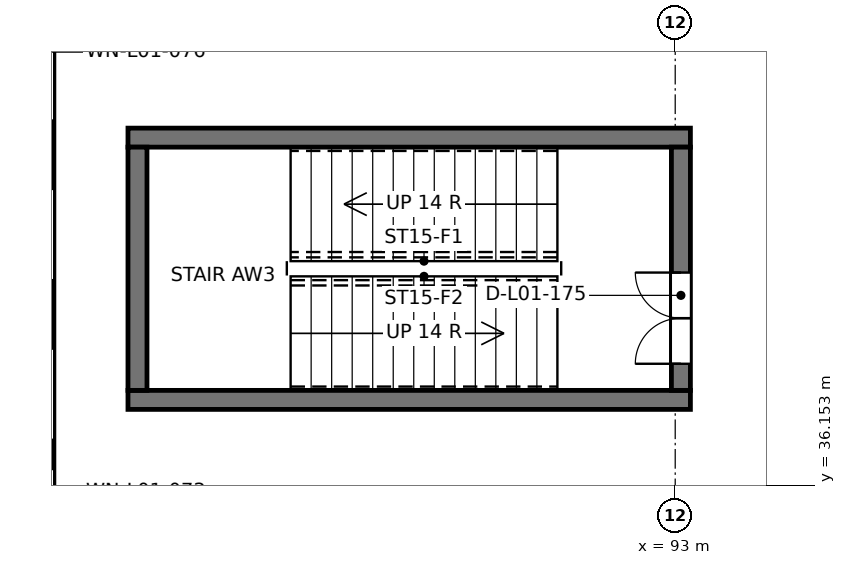
"""IFC4 building model, lengths in metres.
Left out: names, types, materials, properties, quantities, classifications, styles, units other than length and angle.
Written with IfcOpenShell. Run it as: python <this file> out.ifc"""

import sys

from ifc_helpers import new_model, si_unit, direction, frame, frame_2d, origin, place, context, subcontext, project, spatial, rectangle, extrude, element, fill, save


model = new_model("IFC4")
c1 = context("Model", 3, precision=1e-05, world=origin(), true_north=direction((0.0, 1.0)))
c2 = subcontext(c1, "Body", "Model", "MODEL_VIEW")
j1 = project(units=[si_unit("LENGTHUNIT", "METRE"), si_unit("PLANEANGLEUNIT", "RADIAN")], contexts=[c1])
p1 = place(None, origin())
s1 = spatial("IfcSite", under=j1, at=p1, CompositionType="ELEMENT")
p2 = place(p1, origin())
s2 = spatial("IfcBuilding", under=s1, at=p2, CompositionType="ELEMENT")
p3 = place(p2, frame((0.0, 0.0, 4.8)))
s3 = spatial("IfcBuildingStorey", under=s2, at=p3, CompositionType="ELEMENT", Elevation=4.8)
for number, where, z_axis, x_axis in (
    (1, (85.8, 37.275, 0.0), (0.0, 0.0, 1.0), (1.0, 0.0, 0.0)),
    (2, (85.8, 40.725, 0.0), (0.0, 0.0, 1.0), (1.0, 0.0, 0.0)),
):
    element("IfcWall", number, at=place(p3, frame(where, z_axis=z_axis, x_axis=x_axis)), inside=s3, PredefinedType="SOLIDWALL", context=c2, shape_type="SweptSolid", body=[
        extrude(rectangle(XDim=7.4, YDim=0.25, at=frame_2d((3.7, 0.0))), origin(), (0.0, 0.0, 1.0), 4.8),
    ])
p4 = place(p3, frame((85.925, 37.4, 0.0), z_axis=(0.0, 0.0, 1.0), x_axis=(0.0, 1.0, 0.0)))
e3 = element("IfcWall", 3, at=p4, inside=s3, PredefinedType="SOLIDWALL", context=c2, shape_type="SweptSolid", body=[
    extrude(rectangle(XDim=3.2, YDim=0.25, at=frame_2d((1.6, 0.0))), origin(), (0.0, 0.0, 1.0), 4.8),
])
p5 = place(p3, frame((93.075, 37.4, 0.0), z_axis=(0.0, 0.0, 1.0), x_axis=(0.0, 1.0, 0.0)))
e4 = element("IfcWall", 4, at=p5, inside=s3, PredefinedType="SOLIDWALL", context=c2, shape_type="SweptSolid", body=[
    extrude(rectangle(XDim=3.2, YDim=0.25, at=frame_2d((1.6, 0.0))), origin(), (0.0, 0.0, 1.0), 4.8),
])
p6 = place(p5, frame((0.35, 0.0, 0.0)))
e5 = element("IfcOpeningElement", 5, at=p6, cuts=e4, PredefinedType="OPENING", context=c2, shape_type="SweptSolid", body=[
    extrude(rectangle(XDim=1.2, YDim=2.1, at=frame_2d((0.6, 1.05))), frame((0.0, 0.135, 0.0), z_axis=(0.0, -1.0, 0.0), x_axis=(1.0, 0.0, 0.0)), (0.0, 0.0, 1.0), 0.27),
])
p7 = place(p3, frame((84.6, 42.3, 0.0), z_axis=(0.0, 0.0, 1.0), x_axis=(0.0, -1.0, 0.0)))
e6 = element("IfcWall", 6, at=p7, inside=s3, PredefinedType="SOLIDWALL", context=c2, shape_type="SweptSolid", body=[
    extrude(rectangle(XDim=7.8, YDim=0.45, at=frame_2d((3.9, 0.0))), origin(), (0.0, 0.0, 1.0), 3.84),
])
p8 = place(p7, frame((5.935, 0.0, 0.9)))
e7 = element("IfcOpeningElement", 7, at=p8, cuts=e6, PredefinedType="OPENING", context=c2, shape_type="SweptSolid", body=[
    extrude(rectangle(XDim=1.2, YDim=2.4, at=frame_2d((0.6, 1.2))), frame((0.0, 0.235, 0.0), z_axis=(0.0, -1.0, 0.0), x_axis=(1.0, 0.0, 0.0)), (0.0, 0.0, 1.0), 0.47),
])
p9 = place(p7, frame((4.35, 0.0, 0.9)))
e8 = element("IfcOpeningElement", 8, at=p9, cuts=e6, PredefinedType="OPENING", context=c2, shape_type="SweptSolid", body=[
    extrude(rectangle(XDim=1.2, YDim=2.4, at=frame_2d((0.6, 1.2))), frame((0.0, 0.235, 0.0), z_axis=(0.0, -1.0, 0.0), x_axis=(1.0, 0.0, 0.0)), (0.0, 0.0, 1.0), 0.47),
])
p10 = place(p7, frame((2.25, 0.0, 0.9)))
e9 = element("IfcOpeningElement", 9, at=p10, cuts=e6, PredefinedType="OPENING", context=c2, shape_type="SweptSolid", body=[
    extrude(rectangle(XDim=1.2, YDim=2.4, at=frame_2d((0.6, 1.2))), frame((0.0, 0.235, 0.0), z_axis=(0.0, -1.0, 0.0), x_axis=(1.0, 0.0, 0.0)), (0.0, 0.0, 1.0), 0.47),
])
p11 = place(p7, frame((0.15, 0.0, 0.9)))
e10 = element("IfcOpeningElement", 10, at=p11, cuts=e6, PredefinedType="OPENING", context=c2, shape_type="SweptSolid", body=[
    extrude(rectangle(XDim=1.2, YDim=2.4, at=frame_2d((0.6, 1.2))), frame((0.0, 0.235, 0.0), z_axis=(0.0, -1.0, 0.0), x_axis=(1.0, 0.0, 0.0)), (0.0, 0.0, 1.0), 0.47),
])
p12 = place(p6, origin())
e11 = element("IfcDoor", 11, at=p12, inside=s3, OperationType="DOUBLE_DOOR_SINGLE_SWING", PredefinedType="DOOR", context=c2, shape_type="SweptSolid", body=[
    extrude(rectangle(XDim=1.2, YDim=2.1, at=frame_2d((0.6, 1.05))), frame((0.0, 0.025, 0.0), z_axis=(0.0, -1.0, 0.0), x_axis=(1.0, 0.0, 0.0)), (0.0, 0.0, 1.0), 0.05),
])
fill(e5, e11)
save(model, sys.argv[1])
